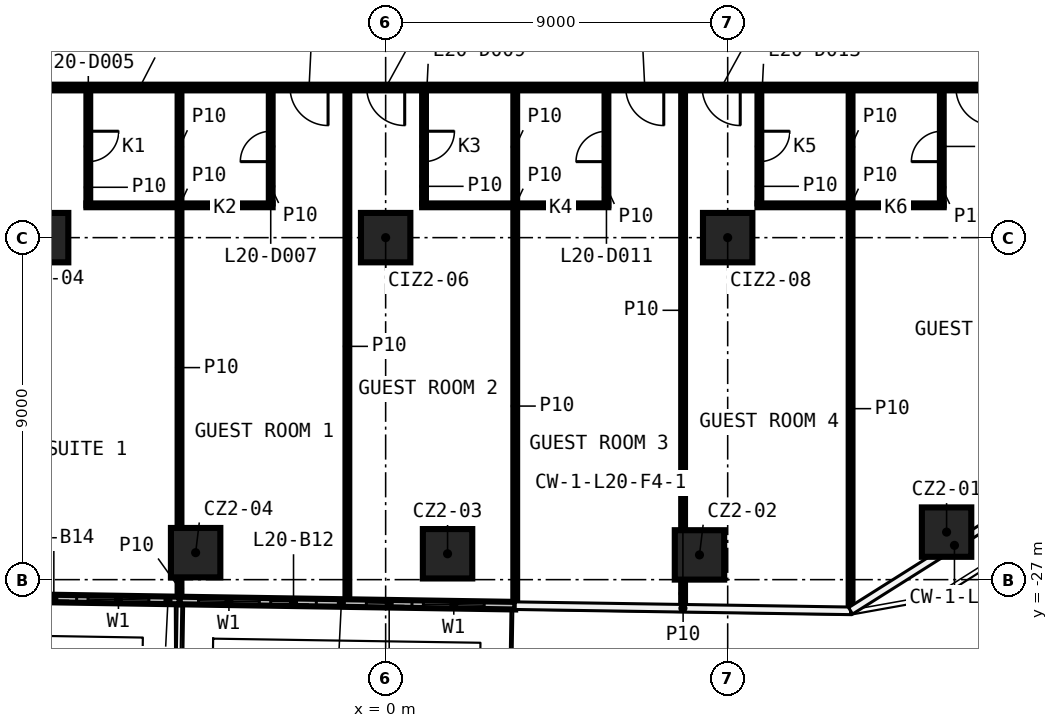
"""IFC4 building model, lengths in metres.
Left out: names, types, materials, properties, quantities, classifications, styles, units other than length and angle.
Written with IfcOpenShell. Run it as: python <this file> out.ifc"""

import sys

from ifc_helpers import new_model, si_unit, direction, frame, frame_2d, origin, origin_2d, place, context, subcontext, project, spatial, rectangle, extrude, element, fill, save


model = new_model("IFC4")
c1 = context("Model", 3, precision=1e-05, world=origin(), true_north=direction((0.0, 1.0)))
c2 = subcontext(c1, "Body", "Model", "MODEL_VIEW")
j1 = project(units=[si_unit("LENGTHUNIT", "METRE"), si_unit("PLANEANGLEUNIT", "RADIAN")], contexts=[c1])
p1 = place(None, origin())
s1 = spatial("IfcSite", under=j1, at=p1, CompositionType="ELEMENT")
p2 = place(p1, origin())
s2 = spatial("IfcBuilding", under=s1, at=p2, CompositionType="ELEMENT")
p3 = place(p2, frame((0.0, 0.0, 98.9)))
s3 = spatial("IfcBuildingStorey", under=s2, at=p3, CompositionType="ELEMENT", Elevation=98.9)
for number, where, z_axis, x_axis in (
    (1, (14.76, -25.749, 0.0), (0.0, 0.0, 1.0), (1.0, 0.0, 0.0)),
    (2, (8.258, -26.349, 0.0), (0.0, 0.0, 1.0), (1.0, 0.0, 0.0)),
    (3, (1.629, -26.319, 0.0), (0.0, 0.0, 1.0), (1.0, 0.0, 0.0)),
    (4, (-5.0, -26.29, 0.0), (0.0, 0.0, 1.0), (1.0, 0.0, 0.0)),
    (5, (-9.0, -18.0, 0.0), (0.0, 0.0, 1.0), (1.0, 0.0, 0.0)),
    (6, (0.0, -18.0, 0.0), (0.0, 0.0, 1.0), (1.0, 0.0, 0.0)),
    (7, (9.0, -18.0, 0.0), (0.0, 0.0, 1.0), (1.0, 0.0, 0.0)),
):
    element("IfcColumn", number, at=place(p3, frame(where, z_axis=z_axis, x_axis=x_axis)), inside=s3, PredefinedType="COLUMN", context=c2, shape_type="SweptSolid", body=[
        extrude(rectangle(XDim=1.3, YDim=1.3, at=origin_2d()), origin(), (0.0, 0.0, 1.0), 3.25),
    ])
p4 = place(p3, frame((-7.874, -17.15, 0.0), z_axis=(0.0, 0.0, 1.0), x_axis=(1.0, 0.0, 0.0)))
e8 = element("IfcWall", 8, at=p4, inside=s3, PredefinedType="PARTITIONING", context=c2, shape_type="SweptSolid", body=[
    extrude(rectangle(XDim=4.9, YDim=0.1, at=frame_2d((2.45, 0.0))), origin(), (0.0, 0.0, 1.0), 3.25),
])
for number, where, z_axis, x_axis in (
    (9, (0.96, -17.15, 0.0), (0.0, 0.0, 1.0), (1.0, 0.0, 0.0)),
    (10, (9.784, -17.15, 0.0), (0.0, 0.0, 1.0), (1.0, 0.0, 0.0)),
):
    element("IfcWall", number, at=place(p3, frame(where, z_axis=z_axis, x_axis=x_axis)), inside=s3, PredefinedType="PARTITIONING", context=c2, shape_type="SweptSolid", body=[
        extrude(rectangle(XDim=4.9, YDim=0.1, at=frame_2d((2.45, 0.0))), origin(), (0.0, 0.0, 1.0), 3.25),
    ])
p5 = place(p3, frame((17.125, -14.05, 0.0), z_axis=(0.0, 0.0, 1.0), x_axis=(-1.0, 0.0, 0.0)))
e11 = element("IfcWall", 11, at=p5, inside=s3, PredefinedType="PARTITIONING", context=c2, shape_type="SweptSolid", body=[
    extrude(rectangle(XDim=34.25, YDim=0.15, at=frame_2d((17.125, 0.0))), origin(), (0.0, 0.0, 1.0), 3.25),
])
p6 = place(p5, frame((32.158, 0.0, 0.0)))
e12 = element("IfcOpeningElement", 12, at=p6, cuts=e11, PredefinedType="OPENING", context=c2, shape_type="SweptSolid", body=[
    extrude(rectangle(XDim=0.9, YDim=2.1, at=frame_2d((0.45, 1.05))), frame((0.0, 0.085, 0.0), z_axis=(0.0, -1.0, 0.0), x_axis=(1.0, 0.0, 0.0)), (0.0, 0.0, 1.0), 0.17),
])
p7 = place(p5, frame((27.561, 0.0, 0.0)))
e13 = element("IfcOpeningElement", 13, at=p7, cuts=e11, PredefinedType="OPENING", context=c2, shape_type="SweptSolid", body=[
    extrude(rectangle(XDim=1.0, YDim=2.1, at=frame_2d((0.5, 1.05))), frame((0.0, 0.085, 0.0), z_axis=(0.0, -1.0, 0.0), x_axis=(1.0, 0.0, 0.0)), (0.0, 0.0, 1.0), 0.17),
])
p8 = place(p5, frame((18.64, 0.0, 0.0)))
e14 = element("IfcOpeningElement", 14, at=p8, cuts=e11, PredefinedType="OPENING", context=c2, shape_type="SweptSolid", body=[
    extrude(rectangle(XDim=1.0, YDim=2.1, at=frame_2d((0.5, 1.05))), frame((0.0, 0.085, 0.0), z_axis=(0.0, -1.0, 0.0), x_axis=(1.0, 0.0, 0.0)), (0.0, 0.0, 1.0), 0.17),
])
p9 = place(p5, frame((16.624, 0.0, 0.0)))
e15 = element("IfcOpeningElement", 15, at=p9, cuts=e11, PredefinedType="OPENING", context=c2, shape_type="SweptSolid", body=[
    extrude(rectangle(XDim=1.0, YDim=2.1, at=frame_2d((0.5, 1.05))), frame((0.0, 0.085, 0.0), z_axis=(0.0, -1.0, 0.0), x_axis=(1.0, 0.0, 0.0)), (0.0, 0.0, 1.0), 0.17),
])
p10 = place(p5, frame((9.807, 0.0, 0.0)))
e16 = element("IfcOpeningElement", 16, at=p10, cuts=e11, PredefinedType="OPENING", context=c2, shape_type="SweptSolid", body=[
    extrude(rectangle(XDim=1.0, YDim=2.1, at=frame_2d((0.5, 1.05))), frame((0.0, 0.085, 0.0), z_axis=(0.0, -1.0, 0.0), x_axis=(1.0, 0.0, 0.0)), (0.0, 0.0, 1.0), 0.17),
])
p11 = place(p5, frame((7.795, 0.0, 0.0)))
e17 = element("IfcOpeningElement", 17, at=p11, cuts=e11, PredefinedType="OPENING", context=c2, shape_type="SweptSolid", body=[
    extrude(rectangle(XDim=1.0, YDim=2.1, at=frame_2d((0.5, 1.05))), frame((0.0, 0.085, 0.0), z_axis=(0.0, -1.0, 0.0), x_axis=(1.0, 0.0, 0.0)), (0.0, 0.0, 1.0), 0.17),
])
p12 = place(p5, frame((1.119, 0.0, 0.0)))
e18 = element("IfcOpeningElement", 18, at=p12, cuts=e11, PredefinedType="OPENING", context=c2, shape_type="SweptSolid", body=[
    extrude(rectangle(XDim=1.0, YDim=2.1, at=frame_2d((0.5, 1.05))), frame((0.0, 0.085, 0.0), z_axis=(0.0, -1.0, 0.0), x_axis=(1.0, 0.0, 0.0)), (0.0, 0.0, 1.0), 0.17),
])
p13 = place(p3, frame((14.634, -17.15, 0.0), z_axis=(0.0, 0.0, 1.0), x_axis=(0.0, 1.0, 0.0)))
e19 = element("IfcWall", 19, at=p13, inside=s3, PredefinedType="PARTITIONING", context=c2, shape_type="SweptSolid", body=[
    extrude(rectangle(XDim=3.025, YDim=0.1, at=frame_2d((1.512, 0.0))), origin(), (0.0, 0.0, 1.0), 3.25),
])
p14 = place(p13, frame((1.15, 0.0, 0.0)))
e20 = element("IfcOpeningElement", 20, at=p14, cuts=e19, PredefinedType="OPENING", context=c2, shape_type="SweptSolid", body=[
    extrude(rectangle(XDim=0.8, YDim=2.1, at=frame_2d((0.4, 1.05))), frame((0.0, 0.06, 0.0), z_axis=(0.0, -1.0, 0.0), x_axis=(1.0, 0.0, 0.0)), (0.0, 0.0, 1.0), 0.12),
])
p15 = place(p3, frame((12.234, -27.801, 0.0), z_axis=(0.0, 0.0, 1.0), x_axis=(0.0, 1.0, 0.0)))
e21 = element("IfcWall", 21, at=p15, inside=s3, PredefinedType="PARTITIONING", context=c2, shape_type="SweptSolid", body=[
    extrude(rectangle(XDim=10.601, YDim=0.1, at=frame_2d((5.3, 0.0))), origin(), (0.0, 0.0, 1.0), 3.25),
])
p16 = place(p3, frame((12.234, -17.1, 0.0), z_axis=(0.0, 0.0, 1.0), x_axis=(0.0, 1.0, 0.0)))
e22 = element("IfcWall", 22, at=p16, inside=s3, PredefinedType="PARTITIONING", context=c2, shape_type="SweptSolid", body=[
    extrude(rectangle(XDim=2.975, YDim=0.1, at=frame_2d((1.488, 0.0))), origin(), (0.0, 0.0, 1.0), 3.25),
])
p17 = place(p3, frame((9.834, -14.125, 0.0), z_axis=(0.0, 0.0, 1.0), x_axis=(0.0, -1.0, 0.0)))
e23 = element("IfcWall", 23, at=p17, inside=s3, PredefinedType="PARTITIONING", context=c2, shape_type="SweptSolid", body=[
    extrude(rectangle(XDim=2.975, YDim=0.1, at=frame_2d((1.488, 0.0))), origin(), (0.0, 0.0, 1.0), 3.25),
])
p18 = place(p17, frame((1.075, 0.0, 0.0)))
e24 = element("IfcOpeningElement", 24, at=p18, cuts=e23, PredefinedType="OPENING", context=c2, shape_type="SweptSolid", body=[
    extrude(rectangle(XDim=0.8, YDim=2.1, at=frame_2d((0.4, 1.05))), frame((0.0, 0.06, 0.0), z_axis=(0.0, -1.0, 0.0), x_axis=(1.0, 0.0, 0.0)), (0.0, 0.0, 1.0), 0.12),
])
p19 = place(p3, frame((7.827, -27.733, 0.0), z_axis=(0.0, 0.0, 1.0), x_axis=(0.0, 1.0, 0.0)))
e25 = element("IfcWall", 25, at=p19, inside=s3, PredefinedType="PARTITIONING", context=c2, shape_type="SweptSolid", body=[
    extrude(rectangle(XDim=0.734, YDim=0.1, at=frame_2d((0.367, 0.0))), origin(), (0.0, 0.0, 1.0), 3.25),
])
p20 = place(p3, frame((7.827, -25.699, 0.0), z_axis=(0.0, 0.0, 1.0), x_axis=(0.0, 1.0, 0.0)))
e26 = element("IfcWall", 26, at=p20, inside=s3, PredefinedType="PARTITIONING", context=c2, shape_type="SweptSolid", body=[
    extrude(rectangle(XDim=11.574, YDim=0.1, at=frame_2d((5.787, 0.0))), origin(), (0.0, 0.0, 1.0), 3.25),
])
p21 = place(p3, frame((5.81, -17.15, 0.0), z_axis=(0.0, 0.0, 1.0), x_axis=(0.0, 1.0, 0.0)))
e27 = element("IfcWall", 27, at=p21, inside=s3, PredefinedType="PARTITIONING", context=c2, shape_type="SweptSolid", body=[
    extrude(rectangle(XDim=3.025, YDim=0.1, at=frame_2d((1.512, 0.0))), origin(), (0.0, 0.0, 1.0), 3.25),
])
p22 = place(p21, frame((1.15, 0.0, 0.0)))
e28 = element("IfcOpeningElement", 28, at=p22, cuts=e27, PredefinedType="OPENING", context=c2, shape_type="SweptSolid", body=[
    extrude(rectangle(XDim=0.8, YDim=2.1, at=frame_2d((0.4, 1.05))), frame((0.0, 0.06, 0.0), z_axis=(0.0, -1.0, 0.0), x_axis=(1.0, 0.0, 0.0)), (0.0, 0.0, 1.0), 0.12),
])
p23 = place(p3, frame((3.41, -27.665, 0.0), z_axis=(0.0, 0.0, 1.0), x_axis=(0.0, 1.0, 0.0)))
e29 = element("IfcWall", 29, at=p23, inside=s3, PredefinedType="PARTITIONING", context=c2, shape_type="SweptSolid", body=[
    extrude(rectangle(XDim=10.465, YDim=0.1, at=frame_2d((5.232, 0.0))), origin(), (0.0, 0.0, 1.0), 3.25),
])
p24 = place(p3, frame((3.41, -17.1, 0.0), z_axis=(0.0, 0.0, 1.0), x_axis=(0.0, 1.0, 0.0)))
e30 = element("IfcWall", 30, at=p24, inside=s3, PredefinedType="PARTITIONING", context=c2, shape_type="SweptSolid", body=[
    extrude(rectangle(XDim=2.975, YDim=0.1, at=frame_2d((1.488, 0.0))), origin(), (0.0, 0.0, 1.0), 3.25),
])
p25 = place(p3, frame((1.01, -14.125, 0.0), z_axis=(0.0, 0.0, 1.0), x_axis=(0.0, -1.0, 0.0)))
e31 = element("IfcWall", 31, at=p25, inside=s3, PredefinedType="PARTITIONING", context=c2, shape_type="SweptSolid", body=[
    extrude(rectangle(XDim=2.975, YDim=0.1, at=frame_2d((1.488, 0.0))), origin(), (0.0, 0.0, 1.0), 3.25),
])
p26 = place(p25, frame((1.075, 0.0, 0.0)))
e32 = element("IfcOpeningElement", 32, at=p26, cuts=e31, PredefinedType="OPENING", context=c2, shape_type="SweptSolid", body=[
    extrude(rectangle(XDim=0.8, YDim=2.1, at=frame_2d((0.4, 1.05))), frame((0.0, 0.06, 0.0), z_axis=(0.0, -1.0, 0.0), x_axis=(1.0, 0.0, 0.0)), (0.0, 0.0, 1.0), 0.12),
])
p27 = place(p3, frame((-1.007, -27.597, 0.0), z_axis=(0.0, 0.0, 1.0), x_axis=(0.0, 1.0, 0.0)))
e33 = element("IfcWall", 33, at=p27, inside=s3, PredefinedType="PARTITIONING", context=c2, shape_type="SweptSolid", body=[
    extrude(rectangle(XDim=13.472, YDim=0.1, at=frame_2d((6.736, 0.0))), origin(), (0.0, 0.0, 1.0), 3.25),
])
p28 = place(p3, frame((-3.024, -17.1, 0.0), z_axis=(0.0, 0.0, 1.0), x_axis=(0.0, 1.0, 0.0)))
e34 = element("IfcWall", 34, at=p28, inside=s3, PredefinedType="PARTITIONING", context=c2, shape_type="SweptSolid", body=[
    extrude(rectangle(XDim=2.975, YDim=0.1, at=frame_2d((1.488, 0.0))), origin(), (0.0, 0.0, 1.0), 3.25),
])
p29 = place(p28, frame((1.1, 0.0, 0.0)))
e35 = element("IfcOpeningElement", 35, at=p29, cuts=e34, PredefinedType="OPENING", context=c2, shape_type="SweptSolid", body=[
    extrude(rectangle(XDim=0.8, YDim=2.1, at=frame_2d((0.4, 1.05))), frame((0.0, 0.06, 0.0), z_axis=(0.0, -1.0, 0.0), x_axis=(1.0, 0.0, 0.0)), (0.0, 0.0, 1.0), 0.12),
])
p30 = place(p3, frame((-5.424, -27.529, 0.0), z_axis=(0.0, 0.0, 1.0), x_axis=(0.0, 1.0, 0.0)))
e36 = element("IfcWall", 36, at=p30, inside=s3, PredefinedType="PARTITIONING", context=c2, shape_type="SweptSolid", body=[
    extrude(rectangle(XDim=0.589, YDim=0.1, at=frame_2d((0.294, 0.0))), origin(), (0.0, 0.0, 1.0), 3.25),
])
p31 = place(p3, frame((-5.424, -25.64, 0.0), z_axis=(0.0, 0.0, 1.0), x_axis=(0.0, 1.0, 0.0)))
e37 = element("IfcWall", 37, at=p31, inside=s3, PredefinedType="PARTITIONING", context=c2, shape_type="SweptSolid", body=[
    extrude(rectangle(XDim=8.44, YDim=0.1, at=frame_2d((4.22, 0.0))), origin(), (0.0, 0.0, 1.0), 3.25),
])
p32 = place(p3, frame((-5.424, -17.1, 0.0), z_axis=(0.0, 0.0, 1.0), x_axis=(0.0, 1.0, 0.0)))
e38 = element("IfcWall", 38, at=p32, inside=s3, PredefinedType="PARTITIONING", context=c2, shape_type="SweptSolid", body=[
    extrude(rectangle(XDim=2.975, YDim=0.1, at=frame_2d((1.488, 0.0))), origin(), (0.0, 0.0, 1.0), 3.25),
])
p33 = place(p3, frame((-7.824, -14.125, 0.0), z_axis=(0.0, 0.0, 1.0), x_axis=(0.0, -1.0, 0.0)))
e39 = element("IfcWall", 39, at=p33, inside=s3, PredefinedType="PARTITIONING", context=c2, shape_type="SweptSolid", body=[
    extrude(rectangle(XDim=3.025, YDim=0.1, at=frame_2d((1.512, 0.0))), origin(), (0.0, 0.0, 1.0), 3.25),
])
p34 = place(p33, frame((1.075, 0.0, 0.0)))
e40 = element("IfcOpeningElement", 40, at=p34, cuts=e39, PredefinedType="OPENING", context=c2, shape_type="SweptSolid", body=[
    extrude(rectangle(XDim=0.8, YDim=2.1, at=frame_2d((0.4, 1.05))), frame((0.0, 0.06, 0.0), z_axis=(0.0, -1.0, 0.0), x_axis=(1.0, 0.0, 0.0)), (0.0, 0.0, 1.0), 0.12),
])
p35 = place(p3, frame((-5.424, -27.549, 0.0), z_axis=(0.0, 0.0, 1.0), x_axis=(0.999881101657, -0.015420199401, 0.0)))
e41 = element("IfcWall", 41, at=p35, inside=s3, PredefinedType="SOLIDWALL", context=c2, shape_type="SweptSolid", body=[
    extrude(rectangle(XDim=8.834, YDim=0.2, at=frame_2d((4.417, 0.0))), origin(), (0.0, 0.0, 1.0), 3.25),
])
p36 = place(p35, frame((0.5, 0.0, 0.6)))
e42 = element("IfcOpeningElement", 42, at=p36, cuts=e41, PredefinedType="OPENING", context=c2, shape_type="SweptSolid", body=[
    extrude(rectangle(XDim=1.6, YDim=2.4, at=frame_2d((0.8, 1.2))), frame((0.0, 0.11, 0.0), z_axis=(0.0, -1.0, 0.0), x_axis=(1.0, 0.0, 0.0)), (0.0, 0.0, 1.0), 0.22),
])
p37 = place(p35, frame((2.4, 0.0, 0.0)))
e43 = element("IfcOpeningElement", 43, at=p37, cuts=e41, PredefinedType="OPENING", context=c2, shape_type="SweptSolid", body=[
    extrude(rectangle(XDim=1.2, YDim=2.4, at=frame_2d((0.6, 1.2))), frame((0.0, 0.11, 0.0), z_axis=(0.0, -1.0, 0.0), x_axis=(1.0, 0.0, 0.0)), (0.0, 0.0, 1.0), 0.22),
])
p38 = place(p35, frame((6.417, 0.0, 0.6)))
e44 = element("IfcOpeningElement", 44, at=p38, cuts=e41, PredefinedType="OPENING", context=c2, shape_type="SweptSolid", body=[
    extrude(rectangle(XDim=1.6, YDim=2.4, at=frame_2d((0.8, 1.2))), frame((0.0, 0.11, 0.0), z_axis=(0.0, -1.0, 0.0), x_axis=(1.0, 0.0, 0.0)), (0.0, 0.0, 1.0), 0.22),
])
p39 = place(p35, frame((4.917, 0.0, 0.0)))
e45 = element("IfcOpeningElement", 45, at=p39, cuts=e41, PredefinedType="OPENING", context=c2, shape_type="SweptSolid", body=[
    extrude(rectangle(XDim=1.2, YDim=2.4, at=frame_2d((0.6, 1.2))), frame((0.0, 0.11, 0.0), z_axis=(0.0, -1.0, 0.0), x_axis=(1.0, 0.0, 0.0)), (0.0, 0.0, 1.0), 0.22),
])
p40 = place(p3, frame((-9.831, -27.481, 0.0), z_axis=(0.0, 0.0, 1.0), x_axis=(0.99988144177, -0.015398129892, 0.0)))
e46 = element("IfcWall", 46, at=p40, inside=s3, PredefinedType="SOLIDWALL", context=c2, shape_type="SweptSolid", body=[
    extrude(rectangle(XDim=4.408, YDim=0.2, at=frame_2d((2.204, 0.0))), origin(), (0.0, 0.0, 1.0), 3.25),
])
p41 = place(p40, frame((2.0, 0.0, 0.6)))
e47 = element("IfcOpeningElement", 47, at=p41, cuts=e46, PredefinedType="OPENING", context=c2, shape_type="SweptSolid", body=[
    extrude(rectangle(XDim=1.6, YDim=2.4, at=frame_2d((0.8, 1.2))), frame((0.0, 0.11, 0.0), z_axis=(0.0, -1.0, 0.0), x_axis=(1.0, 0.0, 0.0)), (0.0, 0.0, 1.0), 0.22),
])
p42 = place(p40, frame((0.5, 0.0, 0.0)))
e48 = element("IfcOpeningElement", 48, at=p42, cuts=e46, PredefinedType="OPENING", context=c2, shape_type="SweptSolid", body=[
    extrude(rectangle(XDim=1.2, YDim=2.4, at=frame_2d((0.6, 1.2))), frame((0.0, 0.11, 0.0), z_axis=(0.0, -1.0, 0.0), x_axis=(1.0, 0.0, 0.0)), (0.0, 0.0, 1.0), 0.22),
])
p43 = place(p34, origin())
e49 = element("IfcDoor", 49, at=p43, inside=s3, OperationType="SINGLE_SWING_RIGHT", PredefinedType="DOOR", context=c2, shape_type="SweptSolid", body=[
    extrude(rectangle(XDim=0.8, YDim=2.1, at=frame_2d((0.4, 1.05))), frame((0.0, 0.025, 0.0), z_axis=(0.0, -1.0, 0.0), x_axis=(1.0, 0.0, 0.0)), (0.0, 0.0, 1.0), 0.05),
])
fill(e40, e49)
p44 = place(p29, origin())
e50 = element("IfcDoor", 50, at=p44, inside=s3, OperationType="SINGLE_SWING_LEFT", PredefinedType="DOOR", context=c2, shape_type="SweptSolid", body=[
    extrude(rectangle(XDim=0.8, YDim=2.1, at=frame_2d((0.4, 1.05))), frame((0.0, 0.025, 0.0), z_axis=(0.0, -1.0, 0.0), x_axis=(1.0, 0.0, 0.0)), (0.0, 0.0, 1.0), 0.05),
])
fill(e35, e50)
p45 = place(p8, origin())
e51 = element("IfcDoor", 51, at=p45, inside=s3, OperationType="SINGLE_SWING_RIGHT", PredefinedType="DOOR", context=c2, shape_type="SweptSolid", body=[
    extrude(rectangle(XDim=1.0, YDim=2.1, at=frame_2d((0.5, 1.05))), frame((0.0, 0.025, 0.0), z_axis=(0.0, -1.0, 0.0), x_axis=(1.0, 0.0, 0.0)), (0.0, 0.0, 1.0), 0.05),
])
fill(e14, e51)
p46 = place(p26, origin())
e52 = element("IfcDoor", 52, at=p46, inside=s3, OperationType="SINGLE_SWING_RIGHT", PredefinedType="DOOR", context=c2, shape_type="SweptSolid", body=[
    extrude(rectangle(XDim=0.8, YDim=2.1, at=frame_2d((0.4, 1.05))), frame((0.0, 0.025, 0.0), z_axis=(0.0, -1.0, 0.0), x_axis=(1.0, 0.0, 0.0)), (0.0, 0.0, 1.0), 0.05),
])
fill(e32, e52)
p47 = place(p9, origin())
e53 = element("IfcDoor", 53, at=p47, inside=s3, OperationType="SINGLE_SWING_LEFT", PredefinedType="DOOR", context=c2, shape_type="SweptSolid", body=[
    extrude(rectangle(XDim=1.0, YDim=2.1, at=frame_2d((0.5, 1.05))), frame((0.0, 0.025, 0.0), z_axis=(0.0, -1.0, 0.0), x_axis=(1.0, 0.0, 0.0)), (0.0, 0.0, 1.0), 0.05),
])
fill(e15, e53)
p48 = place(p22, origin())
e54 = element("IfcDoor", 54, at=p48, inside=s3, OperationType="SINGLE_SWING_LEFT", PredefinedType="DOOR", context=c2, shape_type="SweptSolid", body=[
    extrude(rectangle(XDim=0.8, YDim=2.1, at=frame_2d((0.4, 1.05))), frame((0.0, 0.025, 0.0), z_axis=(0.0, -1.0, 0.0), x_axis=(1.0, 0.0, 0.0)), (0.0, 0.0, 1.0), 0.05),
])
fill(e28, e54)
p49 = place(p10, origin())
e55 = element("IfcDoor", 55, at=p49, inside=s3, OperationType="SINGLE_SWING_RIGHT", PredefinedType="DOOR", context=c2, shape_type="SweptSolid", body=[
    extrude(rectangle(XDim=1.0, YDim=2.1, at=frame_2d((0.5, 1.05))), frame((0.0, 0.025, 0.0), z_axis=(0.0, -1.0, 0.0), x_axis=(1.0, 0.0, 0.0)), (0.0, 0.0, 1.0), 0.05),
])
fill(e16, e55)
p50 = place(p18, origin())
e56 = element("IfcDoor", 56, at=p50, inside=s3, OperationType="SINGLE_SWING_RIGHT", PredefinedType="DOOR", context=c2, shape_type="SweptSolid", body=[
    extrude(rectangle(XDim=0.8, YDim=2.1, at=frame_2d((0.4, 1.05))), frame((0.0, 0.025, 0.0), z_axis=(0.0, -1.0, 0.0), x_axis=(1.0, 0.0, 0.0)), (0.0, 0.0, 1.0), 0.05),
])
fill(e24, e56)
p51 = place(p11, origin())
e57 = element("IfcDoor", 57, at=p51, inside=s3, OperationType="SINGLE_SWING_LEFT", PredefinedType="DOOR", context=c2, shape_type="SweptSolid", body=[
    extrude(rectangle(XDim=1.0, YDim=2.1, at=frame_2d((0.5, 1.05))), frame((0.0, 0.025, 0.0), z_axis=(0.0, -1.0, 0.0), x_axis=(1.0, 0.0, 0.0)), (0.0, 0.0, 1.0), 0.05),
])
fill(e17, e57)
p52 = place(p14, origin())
e58 = element("IfcDoor", 58, at=p52, inside=s3, OperationType="SINGLE_SWING_LEFT", PredefinedType="DOOR", context=c2, shape_type="SweptSolid", body=[
    extrude(rectangle(XDim=0.8, YDim=2.1, at=frame_2d((0.4, 1.05))), frame((0.0, 0.025, 0.0), z_axis=(0.0, -1.0, 0.0), x_axis=(1.0, 0.0, 0.0)), (0.0, 0.0, 1.0), 0.05),
])
fill(e20, e58)
p53 = place(p12, origin())
e59 = element("IfcDoor", 59, at=p53, inside=s3, OperationType="SINGLE_SWING_RIGHT", PredefinedType="DOOR", context=c2, shape_type="SweptSolid", body=[
    extrude(rectangle(XDim=1.0, YDim=2.1, at=frame_2d((0.5, 1.05))), frame((0.0, 0.025, 0.0), z_axis=(0.0, -1.0, 0.0), x_axis=(1.0, 0.0, 0.0)), (0.0, 0.0, 1.0), 0.05),
])
fill(e18, e59)
p54 = place(p36, origin())
e60 = element("IfcWindow", 60, at=p54, inside=s3, PartitioningType="SINGLE_PANEL", PredefinedType="WINDOW", context=c2, shape_type="SweptSolid", body=[
    extrude(rectangle(XDim=1.6, YDim=2.4, at=frame_2d((0.8, 1.2))), frame((0.0, 0.03, 0.0), z_axis=(0.0, -1.0, 0.0), x_axis=(1.0, 0.0, 0.0)), (0.0, 0.0, 1.0), 0.06),
])
fill(e42, e60)
p55 = place(p37, origin())
e61 = element("IfcDoor", 61, at=p55, inside=s3, OperationType="SLIDING_TO_LEFT", PredefinedType="DOOR", context=c2, shape_type="SweptSolid", body=[
    extrude(rectangle(XDim=1.2, YDim=2.4, at=frame_2d((0.6, 1.2))), frame((0.0, 0.025, 0.0), z_axis=(0.0, -1.0, 0.0), x_axis=(1.0, 0.0, 0.0)), (0.0, 0.0, 1.0), 0.05),
])
fill(e43, e61)
p56 = place(p38, origin())
e62 = element("IfcWindow", 62, at=p56, inside=s3, PartitioningType="SINGLE_PANEL", PredefinedType="WINDOW", context=c2, shape_type="SweptSolid", body=[
    extrude(rectangle(XDim=1.6, YDim=2.4, at=frame_2d((0.8, 1.2))), frame((0.0, 0.03, 0.0), z_axis=(0.0, -1.0, 0.0), x_axis=(1.0, 0.0, 0.0)), (0.0, 0.0, 1.0), 0.06),
])
fill(e44, e62)
p57 = place(p39, origin())
e63 = element("IfcDoor", 63, at=p57, inside=s3, OperationType="SLIDING_TO_LEFT", PredefinedType="DOOR", context=c2, shape_type="SweptSolid", body=[
    extrude(rectangle(XDim=1.2, YDim=2.4, at=frame_2d((0.6, 1.2))), frame((0.0, 0.025, 0.0), z_axis=(0.0, -1.0, 0.0), x_axis=(1.0, 0.0, 0.0)), (0.0, 0.0, 1.0), 0.05),
])
fill(e45, e63)
p58 = place(p41, origin())
e64 = element("IfcWindow", 64, at=p58, inside=s3, PartitioningType="SINGLE_PANEL", PredefinedType="WINDOW", context=c2, shape_type="SweptSolid", body=[
    extrude(rectangle(XDim=1.6, YDim=2.4, at=frame_2d((0.8, 1.2))), frame((0.0, 0.03, 0.0), z_axis=(0.0, -1.0, 0.0), x_axis=(1.0, 0.0, 0.0)), (0.0, 0.0, 1.0), 0.06),
])
fill(e47, e64)
p59 = place(p42, origin())
e65 = element("IfcDoor", 65, at=p59, inside=s3, OperationType="SLIDING_TO_LEFT", PredefinedType="DOOR", context=c2, shape_type="SweptSolid", body=[
    extrude(rectangle(XDim=1.2, YDim=2.4, at=frame_2d((0.6, 1.2))), frame((0.0, 0.025, 0.0), z_axis=(0.0, -1.0, 0.0), x_axis=(1.0, 0.0, 0.0)), (0.0, 0.0, 1.0), 0.05),
])
fill(e48, e65)
save(model, sys.argv[1])
